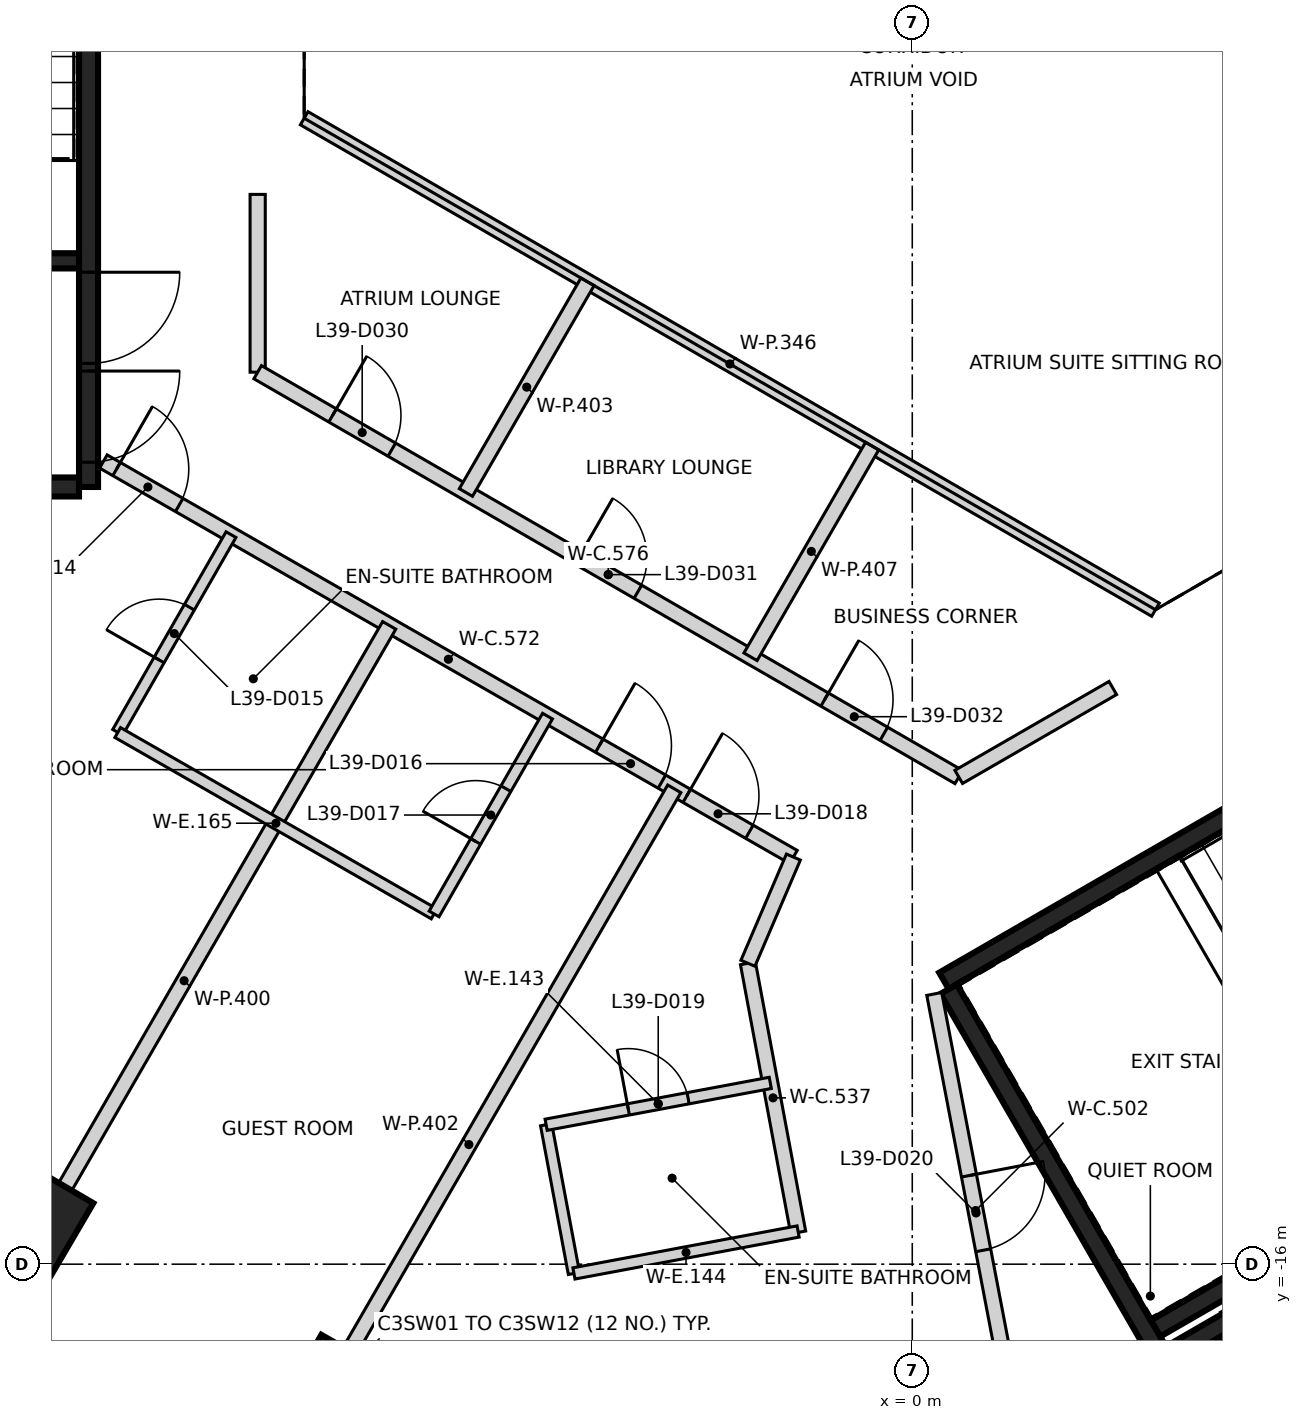
"""IFC4 building model, lengths in metres.
Left out: names, types, materials, properties, quantities, classifications, styles, units other than length and angle.
Written with IfcOpenShell. Run it as: python <this file> out.ifc"""

import sys

from ifc_helpers import new_model, si_unit, direction, frame, frame_2d, origin, origin_2d, place, context, subcontext, project, spatial, rectangle, extrude, element, fill, save


model = new_model("IFC4")
c1 = context("Model", 3, precision=1e-05, world=origin(), true_north=direction((0.0, 1.0)))
c2 = subcontext(c1, "Body", "Model", "MODEL_VIEW")
j1 = project(units=[si_unit("LENGTHUNIT", "METRE"), si_unit("PLANEANGLEUNIT", "RADIAN")], contexts=[c1])
p1 = place(None, origin())
s1 = spatial("IfcSite", under=j1, at=p1, CompositionType="ELEMENT")
p2 = place(p1, origin())
s2 = spatial("IfcBuilding", under=s1, at=p2, CompositionType="ELEMENT")
p3 = place(p2, frame((0.0, 0.0, 157.6)))
s3 = spatial("IfcBuildingStorey", under=s2, at=p3, CompositionType="ELEMENT", Elevation=157.6)
for number, where, z_axis, x_axis in (
    (1, (-11.457, -15.522, -0.4), (0.0, 0.0, 1.0), (0.505, 0.863, 0.0)),
    (2, (-7.714, -17.683, -0.4), (0.0, 0.0, 1.0), (0.495, 0.869, 0.0)),
):
    element("IfcColumn", number, at=place(p3, frame(where, z_axis=z_axis, x_axis=x_axis)), inside=s3, PredefinedType="COLUMN", context=c2, shape_type="SweptSolid", body=[
        extrude(rectangle(XDim=1.25, YDim=0.85, at=origin_2d()), origin(), (0.0, 0.0, 1.0), 3.6),
    ])
p4 = place(p3, frame((-10.837, 5.775, 0.0), z_axis=(0.0, 0.0, 1.0), x_axis=(0.0, -1.0, 0.0)))
e3 = element("IfcWall", 3, at=p4, inside=s3, PredefinedType="SHEAR", context=c2, shape_type="SweptSolid", body=[
    extrude(rectangle(XDim=11.55, YDim=0.25, at=frame_2d((5.775, 0.0))), origin(), (0.0, 0.0, 1.0), 3.2),
])
p5 = place(p4, frame((10.025, 0.0, 0.0)))
e4 = element("IfcOpeningElement", 4, at=p5, cuts=e3, PredefinedType="OPENING", context=c2, shape_type="SweptSolid", body=[
    extrude(rectangle(XDim=1.2, YDim=2.1, at=frame_2d((0.6, 1.05))), frame((0.0, 0.135, 0.0), z_axis=(0.0, -1.0, 0.0), x_axis=(1.0, 0.0, 0.0)), (0.0, 0.0, 1.0), 0.27),
])
p6 = place(p4, frame((8.725, 0.0, 0.0)))
e5 = element("IfcOpeningElement", 5, at=p6, cuts=e3, PredefinedType="OPENING", context=c2, shape_type="SweptSolid", body=[
    extrude(rectangle(XDim=1.2, YDim=2.1, at=frame_2d((0.6, 1.05))), frame((0.0, 0.135, 0.0), z_axis=(0.0, -1.0, 0.0), x_axis=(1.0, 0.0, 0.0)), (0.0, 0.0, 1.0), 0.27),
])
p7 = place(p3, frame((-10.963, -5.775, 0.0), z_axis=(0.0, 0.0, 1.0), x_axis=(-1.0, 0.0, 0.0)))
e6 = element("IfcWall", 6, at=p7, inside=s3, PredefinedType="SHEAR", context=c2, shape_type="SweptSolid", body=[
    extrude(rectangle(XDim=5.225, YDim=0.25, at=frame_2d((2.612, 0.0))), origin(), (0.0, 0.0, 1.0), 3.2),
])
p8 = place(p3, frame((-10.963, -2.8, 0.0), z_axis=(0.0, 0.0, 1.0), x_axis=(-1.0, 0.0, 0.0)))
e7 = element("IfcWall", 7, at=p8, inside=s3, PredefinedType="SHEAR", context=c2, shape_type="SweptSolid", body=[
    extrude(rectangle(XDim=5.098, YDim=0.2, at=frame_2d((2.549, 0.0))), origin(), (0.0, 0.0, 1.0), 3.2),
])
p9 = place(p8, frame((1.774, 0.0, 0.0)))
e8 = element("IfcOpeningElement", 8, at=p9, cuts=e7, PredefinedType="OPENING", context=c2, shape_type="SweptSolid", body=[
    extrude(rectangle(XDim=1.4, YDim=2.1, at=frame_2d((0.7, 1.05))), frame((0.0, 0.11, 0.0), z_axis=(0.0, -1.0, 0.0), x_axis=(1.0, 0.0, 0.0)), (0.0, 0.0, 1.0), 0.22),
])
p10 = place(p3, frame((0.417, -12.273, 0.0), z_axis=(0.0, 0.0, 1.0), x_axis=(0.866021906294, 0.500006057782, 0.0)))
e9 = element("IfcWall", 9, at=p10, inside=s3, PredefinedType="SHEAR", context=c2, shape_type="SweptSolid", body=[
    extrude(rectangle(XDim=11.55, YDim=0.25, at=frame_2d((5.775, 0.0))), origin(), (0.0, 0.0, 1.0), 3.2),
])
p11 = place(p10, frame((10.025, 0.0, 0.0)))
e10 = element("IfcOpeningElement", 10, at=p11, cuts=e9, PredefinedType="OPENING", context=c2, shape_type="SweptSolid", body=[
    extrude(rectangle(XDim=1.2, YDim=2.1, at=frame_2d((0.6, 1.05))), frame((0.0, 0.135, 0.0), z_axis=(0.0, -1.0, 0.0), x_axis=(1.0, 0.0, 0.0)), (0.0, 0.0, 1.0), 0.27),
])
p12 = place(p10, frame((8.725, 0.0, 0.0)))
e11 = element("IfcOpeningElement", 11, at=p12, cuts=e9, PredefinedType="OPENING", context=c2, shape_type="SweptSolid", body=[
    extrude(rectangle(XDim=1.2, YDim=2.1, at=frame_2d((0.6, 1.05))), frame((0.0, 0.135, 0.0), z_axis=(0.0, -1.0, 0.0), x_axis=(1.0, 0.0, 0.0)), (0.0, 0.0, 1.0), 0.27),
])
p13 = place(p3, frame((3.235, -17.153, 0.0), z_axis=(0.0, 0.0, 1.0), x_axis=(-0.500008851346, 0.866020293397, 0.0)))
e12 = element("IfcWall", 12, at=p13, inside=s3, PredefinedType="SHEAR", context=c2, shape_type="SweptSolid", body=[
    extrude(rectangle(XDim=5.51, YDim=0.25, at=frame_2d((2.755, 0.0))), origin(), (0.0, 0.0, 1.0), 3.2),
])
p14 = place(p3, frame((1.669, -18.19, 0.0), z_axis=(0.0, 0.0, 1.0), x_axis=(0.866042235819, 0.499970844928, 0.0)))
e13 = element("IfcWall", 13, at=p14, inside=s3, PredefinedType="SHEAR", context=c2, shape_type="SweptSolid", body=[
    extrude(rectangle(XDim=2.865, YDim=0.25, at=frame_2d((1.432, 0.0))), origin(), (0.0, 0.0, 1.0), 3.2),
])
p15 = place(p3, frame((5.322, -15.619, 0.0), z_axis=(0.0, 0.0, 1.0), x_axis=(-0.866026229868, -0.499998569178, 0.0)))
e14 = element("IfcWall", 14, at=p15, inside=s3, PredefinedType="SHEAR", context=c2, shape_type="SweptSolid", body=[
    extrude(rectangle(XDim=2.449, YDim=0.25, at=frame_2d((1.225, 0.0))), origin(), (0.0, 0.0, 1.0), 3.2),
])
p16 = place(p3, frame((5.503, -19.352, 0.0), z_axis=(0.0, 0.0, 1.0), x_axis=(-0.499986818241, 0.866033014143, 0.0)))
e15 = element("IfcWall", 15, at=p16, inside=s3, PredefinedType="SHEAR", context=c2, shape_type="SweptSolid", body=[
    extrude(rectangle(XDim=2.798, YDim=0.2, at=frame_2d((1.399, 0.0))), origin(), (0.0, 0.0, 1.0), 3.2),
])
p17 = place(p16, frame((0.949, 0.0, 0.0)))
e16 = element("IfcOpeningElement", 16, at=p17, cuts=e15, PredefinedType="OPENING", context=c2, shape_type="SweptSolid", body=[
    extrude(rectangle(XDim=0.9, YDim=2.1, at=frame_2d((0.45, 1.05))), frame((0.0, 0.11, 0.0), z_axis=(0.0, -1.0, 0.0), x_axis=(1.0, 0.0, 0.0)), (0.0, 0.0, 1.0), 0.22),
])
p18 = place(p3, frame((-10.642, -5.44, 0.0), z_axis=(0.0, 0.0, 1.0), x_axis=(0.867610688994, -0.497244097344, 0.0)))
e17 = element("IfcWall", 17, at=p18, inside=s3, PredefinedType="PARTITIONING", context=c2, shape_type="SweptSolid", body=[
    extrude(rectangle(XDim=10.464, YDim=0.2, at=frame_2d((5.232, 0.0))), origin(), (0.0, 0.0, 1.0), 3.2),
])
p19 = place(p18, frame((0.2, 0.0, 0.0)))
e18 = element("IfcOpeningElement", 18, at=p19, cuts=e17, PredefinedType="OPENING", context=c2, shape_type="SweptSolid", body=[
    extrude(rectangle(XDim=0.95, YDim=2.1, at=frame_2d((0.475, 1.05))), frame((0.0, 0.11, 0.0), z_axis=(0.0, -1.0, 0.0), x_axis=(1.0, 0.0, 0.0)), (0.0, 0.0, 1.0), 0.22),
])
p20 = place(p18, frame((7.519, 0.0, 0.0)))
e19 = element("IfcOpeningElement", 19, at=p20, cuts=e17, PredefinedType="OPENING", context=c2, shape_type="SweptSolid", body=[
    extrude(rectangle(XDim=0.95, YDim=2.1, at=frame_2d((0.475, 1.05))), frame((0.0, 0.11, 0.0), z_axis=(0.0, -1.0, 0.0), x_axis=(1.0, 0.0, 0.0)), (0.0, 0.0, 1.0), 0.22),
])
p21 = place(p18, frame((8.846, 0.0, 0.0)))
e20 = element("IfcOpeningElement", 20, at=p21, cuts=e17, PredefinedType="OPENING", context=c2, shape_type="SweptSolid", body=[
    extrude(rectangle(XDim=0.95, YDim=2.1, at=frame_2d((0.475, 1.05))), frame((0.0, 0.11, 0.0), z_axis=(0.0, -1.0, 0.0), x_axis=(1.0, 0.0, 0.0)), (0.0, 0.0, 1.0), 0.22),
])
p22 = place(p3, frame((-8.612, -4.265, 0.0), z_axis=(0.0, 0.0, 1.0), x_axis=(0.0, 1.0, 0.0)))
e21 = element("IfcWall", 21, at=p22, inside=s3, PredefinedType="PARTITIONING", context=c2, shape_type="SweptSolid", body=[
    extrude(rectangle(XDim=2.339, YDim=0.2, at=frame_2d((1.169, 0.0))), origin(), (0.0, 0.0, 1.0), 3.2),
])
p23 = place(p3, frame((-8.612, -4.265, 0.0), z_axis=(0.0, 0.0, 1.0), x_axis=(0.865984415152, -0.500070987675, 0.0)))
e22 = element("IfcWall", 22, at=p23, inside=s3, PredefinedType="PARTITIONING", context=c2, shape_type="SweptSolid", body=[
    extrude(rectangle(XDim=10.651, YDim=0.2, at=frame_2d((5.326, 0.0))), origin(), (0.0, 0.0, 1.0), 3.2),
])
p24 = place(p23, frame((1.138, 0.0, 0.0)))
e23 = element("IfcOpeningElement", 23, at=p24, cuts=e22, PredefinedType="OPENING", context=c2, shape_type="SweptSolid", body=[
    extrude(rectangle(XDim=0.9, YDim=2.1, at=frame_2d((0.45, 1.05))), frame((0.0, 0.11, 0.0), z_axis=(0.0, -1.0, 0.0), x_axis=(1.0, 0.0, 0.0)), (0.0, 0.0, 1.0), 0.22),
])
p25 = place(p23, frame((4.876, 0.0, 0.0)))
e24 = element("IfcOpeningElement", 24, at=p25, cuts=e22, PredefinedType="OPENING", context=c2, shape_type="SweptSolid", body=[
    extrude(rectangle(XDim=0.9, YDim=2.1, at=frame_2d((0.45, 1.05))), frame((0.0, 0.11, 0.0), z_axis=(0.0, -1.0, 0.0), x_axis=(1.0, 0.0, 0.0)), (0.0, 0.0, 1.0), 0.22),
])
p26 = place(p23, frame((8.613, 0.0, 0.0)))
e25 = element("IfcOpeningElement", 25, at=p26, cuts=e22, PredefinedType="OPENING", context=c2, shape_type="SweptSolid", body=[
    extrude(rectangle(XDim=0.9, YDim=2.1, at=frame_2d((0.45, 1.05))), frame((0.0, 0.11, 0.0), z_axis=(0.0, -1.0, 0.0), x_axis=(1.0, 0.0, 0.0)), (0.0, 0.0, 1.0), 0.22),
])
p27 = place(p3, frame((-2.162, -12.042, 0.0), z_axis=(0.0, 0.0, 1.0), x_axis=(0.183572226488, -0.983006224631, 0.0)))
e26 = element("IfcWall", 26, at=p27, inside=s3, PredefinedType="PARTITIONING", context=c2, shape_type="SweptSolid", body=[
    extrude(rectangle(XDim=3.602, YDim=0.2, at=frame_2d((1.801, 0.0))), origin(), (0.0, 0.0, 1.0), 3.2),
])
p28 = place(p3, frame((-2.162, -12.041, 0.0), z_axis=(0.0, 0.0, 1.0), x_axis=(0.393609042413, 0.919277934974, 0.0)))
e27 = element("IfcWall", 27, at=p28, inside=s3, PredefinedType="PARTITIONING", context=c2, shape_type="SweptSolid", body=[
    extrude(rectangle(XDim=1.52, YDim=0.2, at=frame_2d((0.76, 0.0))), origin(), (0.0, 0.0, 1.0), 3.2),
])
p29 = place(p3, frame((0.289, -12.445, 0.0), z_axis=(0.0, 0.0, 1.0), x_axis=(0.187668946952, -0.982232338273, 0.0)))
e28 = element("IfcWall", 28, at=p29, inside=s3, PredefinedType="PARTITIONING", context=c2, shape_type="SweptSolid", body=[
    extrude(rectangle(XDim=5.802, YDim=0.2, at=frame_2d((2.901, 0.0))), origin(), (0.0, 0.0, 1.0), 3.2),
])
p30 = place(p29, frame((2.433, 0.0, 0.0)))
e29 = element("IfcOpeningElement", 29, at=p30, cuts=e28, PredefinedType="OPENING", context=c2, shape_type="SweptSolid", body=[
    extrude(rectangle(XDim=1.0, YDim=2.1, at=frame_2d((0.5, 1.05))), frame((0.0, 0.11, 0.0), z_axis=(0.0, -1.0, 0.0), x_axis=(1.0, 0.0, 0.0)), (0.0, 0.0, 1.0), 0.22),
])
p31 = place(p3, frame((0.611, -9.589, 0.0), z_axis=(0.0, 0.0, 1.0), x_axis=(0.866220316572, 0.499662249082, 0.0)))
e30 = element("IfcWall", 30, at=p31, inside=s3, PredefinedType="PARTITIONING", context=c2, shape_type="SweptSolid", body=[
    extrude(rectangle(XDim=2.34, YDim=0.2, at=frame_2d((1.17, 0.0))), origin(), (0.0, 0.0, 1.0), 3.2),
])
p32 = place(p3, frame((-12.278, -16.946, 0.0), z_axis=(0.0, 0.0, 1.0), x_axis=(0.499882324153, 0.866093333307, 0.0)))
e31 = element("IfcWall", 31, at=p32, inside=s3, PredefinedType="PARTITIONING", context=c2, shape_type="SweptSolid", body=[
    extrude(rectangle(XDim=10.796, YDim=0.2, at=frame_2d((5.398, 0.0))), origin(), (0.0, 0.0, 1.0), 3.2),
])
p33 = place(p3, frame((-8.535, -19.107, 0.0), z_axis=(0.0, 0.0, 1.0), x_axis=(0.499987057201, 0.866032876184, 0.0)))
e32 = element("IfcWall", 32, at=p33, inside=s3, PredefinedType="PARTITIONING", context=c2, shape_type="SweptSolid", body=[
    extrude(rectangle(XDim=10.809, YDim=0.2, at=frame_2d((5.404, 0.0))), origin(), (0.0, 0.0, 1.0), 3.2),
])
p34 = place(p3, frame((-8.0, -0.924, 0.0), z_axis=(0.0, 0.0, 1.0), x_axis=(0.86604129137, -0.499972480886, 0.0)))
e33 = element("IfcWall", 33, at=p34, inside=s3, PredefinedType="PARTITIONING", context=c2, shape_type="SweptSolid", body=[
    extrude(rectangle(XDim=12.932, YDim=0.2, at=frame_2d((6.466, 0.0))), origin(), (0.0, 0.0, 1.0), 2.3),
])
p35 = place(p3, frame((-5.872, -5.848, 0.0), z_axis=(0.0, 0.0, 1.0), x_axis=(0.499872130319, 0.866099216793, 0.0)))
e34 = element("IfcWall", 34, at=p35, inside=s3, PredefinedType="PARTITIONING", context=c2, shape_type="SweptSolid", body=[
    extrude(rectangle(XDim=3.2, YDim=0.2, at=frame_2d((1.6, 0.0))), origin(), (0.0, 0.0, 1.0), 2.3),
])
p36 = place(p3, frame((-2.128, -8.009, 0.0), z_axis=(0.0, 0.0, 1.0), x_axis=(0.499986558861, 0.866033163891, 0.0)))
e35 = element("IfcWall", 35, at=p36, inside=s3, PredefinedType="PARTITIONING", context=c2, shape_type="SweptSolid", body=[
    extrude(rectangle(XDim=3.201, YDim=0.2, at=frame_2d((1.6, 0.0))), origin(), (0.0, 0.0, 1.0), 2.3),
])
p37 = place(p3, frame((-10.454, -9.003, 0.0), z_axis=(0.0, 0.0, 1.0), x_axis=(0.49740127306, 0.867520589703, 0.0)))
e36 = element("IfcWall", 36, at=p37, inside=s3, PredefinedType="PARTITIONING", context=c2, shape_type="SweptSolid", body=[
    extrude(rectangle(XDim=2.998, YDim=0.15, at=frame_2d((1.499, 0.0))), origin(), (0.0, 0.0, 1.0), 3.2),
])
p38 = place(p37, frame((1.098, 0.0, 0.0)))
e37 = element("IfcOpeningElement", 37, at=p38, cuts=e36, PredefinedType="OPENING", context=c2, shape_type="SweptSolid", body=[
    extrude(rectangle(XDim=0.8, YDim=2.1, at=frame_2d((0.4, 1.05))), frame((0.0, 0.085, 0.0), z_axis=(0.0, -1.0, 0.0), x_axis=(1.0, 0.0, 0.0)), (0.0, 0.0, 1.0), 0.17),
])
p39 = place(p3, frame((-10.453, -9.006, 0.0), z_axis=(0.0, 0.0, 1.0), x_axis=(0.86760039778, -0.49726205342, 0.0)))
e38 = element("IfcWall", 38, at=p39, inside=s3, PredefinedType="PARTITIONING", context=c2, shape_type="SweptSolid", body=[
    extrude(rectangle(XDim=4.797, YDim=0.15, at=frame_2d((2.399, 0.0))), origin(), (0.0, 0.0, 1.0), 3.2),
])
p40 = place(p3, frame((-6.291, -11.392, 0.0), z_axis=(0.0, 0.0, 1.0), x_axis=(0.497409432693, 0.867515911248, 0.0)))
e39 = element("IfcWall", 39, at=p40, inside=s3, PredefinedType="PARTITIONING", context=c2, shape_type="SweptSolid", body=[
    extrude(rectangle(XDim=3.0, YDim=0.15, at=frame_2d((1.5, 0.0))), origin(), (0.0, 0.0, 1.0), 3.2),
])
p41 = place(p40, frame((1.1, 0.0, 0.0)))
e40 = element("IfcOpeningElement", 40, at=p41, cuts=e39, PredefinedType="OPENING", context=c2, shape_type="SweptSolid", body=[
    extrude(rectangle(XDim=0.8, YDim=2.1, at=frame_2d((0.4, 1.05))), frame((0.0, 0.085, 0.0), z_axis=(0.0, -1.0, 0.0), x_axis=(1.0, 0.0, 0.0)), (0.0, 0.0, 1.0), 0.17),
])
p42 = place(p3, frame((-4.817, -14.166, 0.0), z_axis=(0.0, 0.0, 1.0), x_axis=(0.183903339385, -0.982944332993, 0.0)))
e41 = element("IfcWall", 41, at=p42, inside=s3, PredefinedType="PARTITIONING", context=c2, shape_type="SweptSolid", body=[
    extrude(rectangle(XDim=1.99, YDim=0.15, at=frame_2d((0.995, 0.0))), origin(), (0.0, 0.0, 1.0), 3.2),
])
p43 = place(p3, frame((-4.817, -14.166, 0.0), z_axis=(0.0, 0.0, 1.0), x_axis=(0.982987155193, 0.183674311555, 0.0)))
e42 = element("IfcWall", 42, at=p43, inside=s3, PredefinedType="PARTITIONING", context=c2, shape_type="SweptSolid", body=[
    extrude(rectangle(XDim=3.0, YDim=0.15, at=frame_2d((1.5, 0.0))), origin(), (0.0, 0.0, 1.0), 3.2),
])
p44 = place(p43, frame((1.1, 0.0, 0.0)))
e43 = element("IfcOpeningElement", 43, at=p44, cuts=e42, PredefinedType="OPENING", context=c2, shape_type="SweptSolid", body=[
    extrude(rectangle(XDim=0.8, YDim=2.1, at=frame_2d((0.4, 1.05))), frame((0.0, 0.085, 0.0), z_axis=(0.0, -1.0, 0.0), x_axis=(1.0, 0.0, 0.0)), (0.0, 0.0, 1.0), 0.17),
])
p45 = place(p3, frame((-4.451, -16.122, 0.0), z_axis=(0.0, 0.0, 1.0), x_axis=(0.982928336035, 0.18398882091, 0.0)))
e44 = element("IfcWall", 44, at=p45, inside=s3, PredefinedType="PARTITIONING", context=c2, shape_type="SweptSolid", body=[
    extrude(rectangle(XDim=3.0, YDim=0.15, at=frame_2d((1.5, 0.0))), origin(), (0.0, 0.0, 1.0), 3.2),
])
p46 = place(p5, origin())
e45 = element("IfcDoor", 45, at=p46, inside=s3, OperationType="SINGLE_SWING_LEFT", PredefinedType="DOOR", context=c2, shape_type="SweptSolid", body=[
    extrude(rectangle(XDim=1.2, YDim=2.1, at=frame_2d((0.6, 1.05))), frame((0.0, 0.025, 0.0), z_axis=(0.0, -1.0, 0.0), x_axis=(1.0, 0.0, 0.0)), (0.0, 0.0, 1.0), 0.05),
])
fill(e4, e45)
p47 = place(p6, origin())
e46 = element("IfcDoor", 46, at=p47, inside=s3, OperationType="SINGLE_SWING_RIGHT", PredefinedType="DOOR", context=c2, shape_type="SweptSolid", body=[
    extrude(rectangle(XDim=1.2, YDim=2.1, at=frame_2d((0.6, 1.05))), frame((0.0, 0.025, 0.0), z_axis=(0.0, -1.0, 0.0), x_axis=(1.0, 0.0, 0.0)), (0.0, 0.0, 1.0), 0.05),
])
fill(e5, e46)
p48 = place(p19, frame((0.95, 0.0, 0.0), z_axis=(0.0, 0.0, 1.0), x_axis=(-1.0, 0.0, 0.0)))
e47 = element("IfcDoor", 47, at=p48, inside=s3, OperationType="SINGLE_SWING_LEFT", PredefinedType="DOOR", context=c2, shape_type="SweptSolid", body=[
    extrude(rectangle(XDim=0.95, YDim=2.1, at=frame_2d((0.475, 1.05))), frame((0.0, 0.025, 0.0), z_axis=(0.0, -1.0, 0.0), x_axis=(1.0, 0.0, 0.0)), (0.0, 0.0, 1.0), 0.05),
])
fill(e18, e47)
p49 = place(p38, origin())
e48 = element("IfcDoor", 48, at=p49, inside=s3, OperationType="SINGLE_SWING_LEFT", PredefinedType="DOOR", context=c2, shape_type="SweptSolid", body=[
    extrude(rectangle(XDim=0.8, YDim=2.1, at=frame_2d((0.4, 1.05))), frame((0.0, 0.025, 0.0), z_axis=(0.0, -1.0, 0.0), x_axis=(1.0, 0.0, 0.0)), (0.0, 0.0, 1.0), 0.05),
])
fill(e37, e48)
p50 = place(p20, frame((0.95, 0.0, 0.0), z_axis=(0.0, 0.0, 1.0), x_axis=(-1.0, 0.0, 0.0)))
e49 = element("IfcDoor", 49, at=p50, inside=s3, OperationType="SINGLE_SWING_LEFT", PredefinedType="DOOR", context=c2, shape_type="SweptSolid", body=[
    extrude(rectangle(XDim=0.95, YDim=2.1, at=frame_2d((0.475, 1.05))), frame((0.0, 0.025, 0.0), z_axis=(0.0, -1.0, 0.0), x_axis=(1.0, 0.0, 0.0)), (0.0, 0.0, 1.0), 0.05),
])
fill(e19, e49)
p51 = place(p41, origin())
e50 = element("IfcDoor", 50, at=p51, inside=s3, OperationType="SINGLE_SWING_LEFT", PredefinedType="DOOR", context=c2, shape_type="SweptSolid", body=[
    extrude(rectangle(XDim=0.8, YDim=2.1, at=frame_2d((0.4, 1.05))), frame((0.0, 0.025, 0.0), z_axis=(0.0, -1.0, 0.0), x_axis=(1.0, 0.0, 0.0)), (0.0, 0.0, 1.0), 0.05),
])
fill(e40, e50)
p52 = place(p21, frame((0.95, 0.0, 0.0), z_axis=(0.0, 0.0, 1.0), x_axis=(-1.0, 0.0, 0.0)))
e51 = element("IfcDoor", 51, at=p52, inside=s3, OperationType="SINGLE_SWING_LEFT", PredefinedType="DOOR", context=c2, shape_type="SweptSolid", body=[
    extrude(rectangle(XDim=0.95, YDim=2.1, at=frame_2d((0.475, 1.05))), frame((0.0, 0.025, 0.0), z_axis=(0.0, -1.0, 0.0), x_axis=(1.0, 0.0, 0.0)), (0.0, 0.0, 1.0), 0.05),
])
fill(e20, e51)
p53 = place(p44, frame((0.8, 0.0, 0.0), z_axis=(0.0, 0.0, 1.0), x_axis=(-1.0, 0.0, 0.0)))
e52 = element("IfcDoor", 52, at=p53, inside=s3, OperationType="SINGLE_SWING_LEFT", PredefinedType="DOOR", context=c2, shape_type="SweptSolid", body=[
    extrude(rectangle(XDim=0.8, YDim=2.1, at=frame_2d((0.4, 1.05))), frame((0.0, 0.025, 0.0), z_axis=(0.0, -1.0, 0.0), x_axis=(1.0, 0.0, 0.0)), (0.0, 0.0, 1.0), 0.05),
])
fill(e43, e52)
p54 = place(p30, origin())
e53 = element("IfcDoor", 53, at=p54, inside=s3, OperationType="SINGLE_SWING_LEFT", PredefinedType="DOOR", context=c2, shape_type="SweptSolid", body=[
    extrude(rectangle(XDim=1.0, YDim=2.1, at=frame_2d((0.5, 1.05))), frame((0.0, 0.025, 0.0), z_axis=(0.0, -1.0, 0.0), x_axis=(1.0, 0.0, 0.0)), (0.0, 0.0, 1.0), 0.05),
])
fill(e29, e53)
p55 = place(p24, origin())
e54 = element("IfcDoor", 54, at=p55, inside=s3, OperationType="SINGLE_SWING_LEFT", PredefinedType="DOOR", context=c2, shape_type="SweptSolid", body=[
    extrude(rectangle(XDim=0.9, YDim=2.1, at=frame_2d((0.45, 1.05))), frame((0.0, 0.025, 0.0), z_axis=(0.0, -1.0, 0.0), x_axis=(1.0, 0.0, 0.0)), (0.0, 0.0, 1.0), 0.05),
])
fill(e23, e54)
p56 = place(p25, origin())
e55 = element("IfcDoor", 55, at=p56, inside=s3, OperationType="SINGLE_SWING_LEFT", PredefinedType="DOOR", context=c2, shape_type="SweptSolid", body=[
    extrude(rectangle(XDim=0.9, YDim=2.1, at=frame_2d((0.45, 1.05))), frame((0.0, 0.025, 0.0), z_axis=(0.0, -1.0, 0.0), x_axis=(1.0, 0.0, 0.0)), (0.0, 0.0, 1.0), 0.05),
])
fill(e24, e55)
p57 = place(p26, origin())
e56 = element("IfcDoor", 56, at=p57, inside=s3, OperationType="SINGLE_SWING_LEFT", PredefinedType="DOOR", context=c2, shape_type="SweptSolid", body=[
    extrude(rectangle(XDim=0.9, YDim=2.1, at=frame_2d((0.45, 1.05))), frame((0.0, 0.025, 0.0), z_axis=(0.0, -1.0, 0.0), x_axis=(1.0, 0.0, 0.0)), (0.0, 0.0, 1.0), 0.05),
])
fill(e25, e56)
save(model, sys.argv[1])
